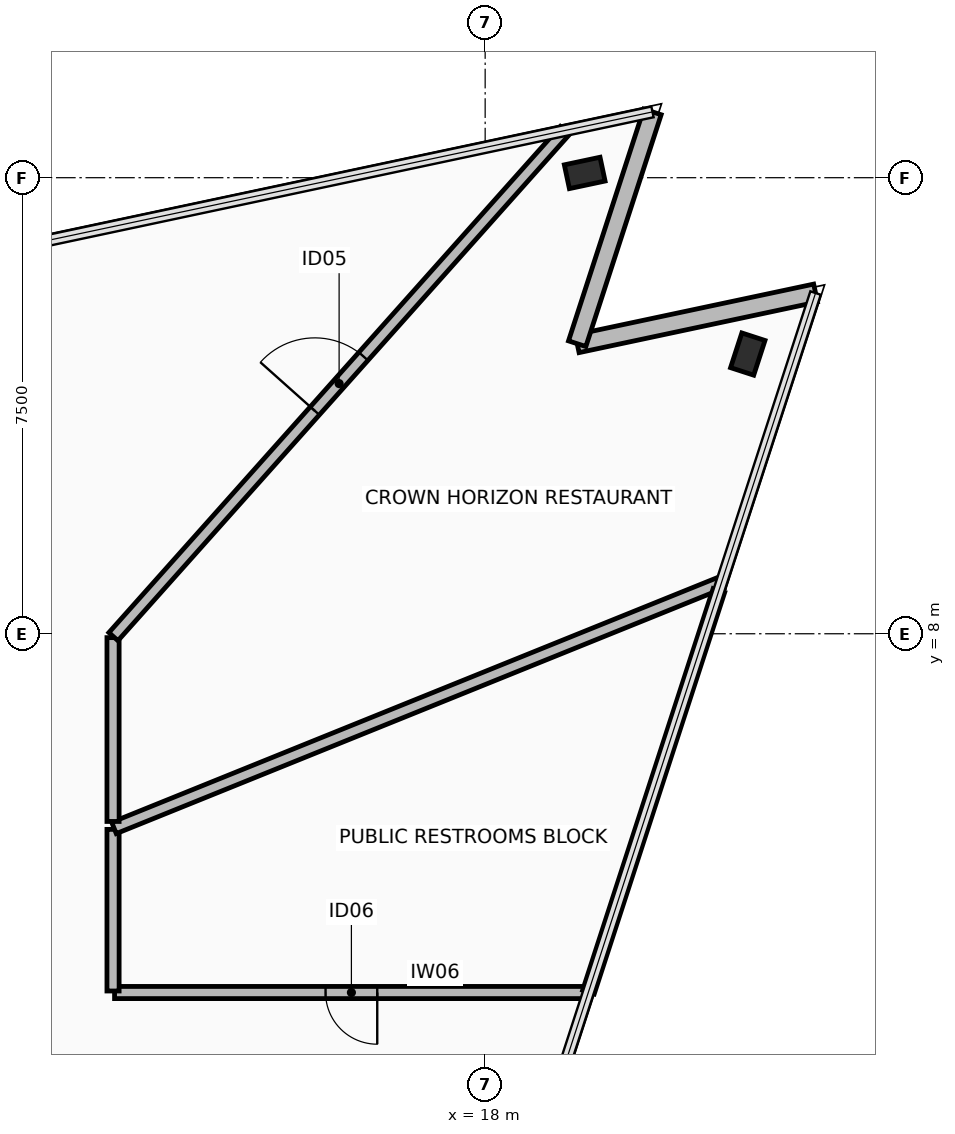
"""IFC4 building model, lengths in metres.
Left out: names, types, materials, properties, quantities, classifications, styles, units other than length and angle.
Written with IfcOpenShell. Run it as: python <this file> out.ifc"""

import sys

from ifc_helpers import new_model, si_unit, direction, frame, frame_2d, origin, origin_2d, place, context, subcontext, project, spatial, rectangle, hollow_rectangle, extrude, element, fill, save


model = new_model("IFC4")
c1 = context("Model", 3, precision=1e-05, world=origin(), true_north=direction((0.0, 1.0)))
c2 = subcontext(c1, "Body", "Model", "MODEL_VIEW")
j1 = project(units=[si_unit("LENGTHUNIT", "METRE"), si_unit("PLANEANGLEUNIT", "RADIAN")], contexts=[c1])
p1 = place(None, origin())
s1 = spatial("IfcSite", under=j1, at=p1, CompositionType="ELEMENT")
p2 = place(p1, origin())
s2 = spatial("IfcBuilding", under=s1, at=p2, CompositionType="ELEMENT")
p3 = place(p2, frame((0.0, 0.0, 298.0)))
s3 = spatial("IfcBuildingStorey", under=s2, at=p3, CompositionType="ELEMENT", Elevation=298.0)
for number, where, z_axis, x_axis in (
    (1, (22.319, 12.6, 0.0), (0.0, 0.0, 1.0), (0.309, 0.951, 0.0)),
    (2, (19.637, 15.578, 0.0), (0.0, 0.0, 1.0), (0.978, 0.208, 0.0)),
):
    element("IfcColumn", number, at=place(p3, frame(where, z_axis=z_axis, x_axis=x_axis)), inside=s3, PredefinedType="COLUMN", context=c2, shape_type="SweptSolid", body=[
        extrude(hollow_rectangle(XDim=0.4, YDim=0.6, WallThickness=0.03, at=origin_2d()), origin(), (0.0, 0.0, 1.0), 4.15),
    ])
p4 = place(p3, frame((23.434, 13.603, 0.0), z_axis=(0.0, 0.0, 1.0), x_axis=(-0.97815049033, -0.207898095871, 0.0)))
e3 = element("IfcWall", 3, at=p4, inside=s3, PredefinedType="STANDARD", context=c2, shape_type="SweptSolid", body=[
    extrude(rectangle(XDim=4.008, YDim=0.3, at=frame_2d((2.004, 0.0))), origin(), (0.0, 0.0, 1.0), 3.295),
])
p5 = place(p3, frame((19.513, 12.77, 0.0), z_axis=(0.0, 0.0, 1.0), x_axis=(0.309018580232, 0.951056001018, 0.0)))
e4 = element("IfcWall", 4, at=p5, inside=s3, PredefinedType="STANDARD", context=c2, shape_type="SweptSolid", body=[
    extrude(rectangle(XDim=4.008, YDim=0.3, at=frame_2d((2.004, 0.0))), origin(), (0.0, 0.0, 1.0), 3.295),
])
p6 = place(p3, frame((19.696, 2.1, 0.0), z_axis=(0.0, 0.0, 1.0), x_axis=(-1.0, 0.0, 0.0)))
e5 = element("IfcWall", 5, at=p6, inside=s3, PredefinedType="PARTITIONING", context=c2, shape_type="SweptSolid", body=[
    extrude(rectangle(XDim=7.791, YDim=0.2, at=frame_2d((3.896, 0.0))), origin(), (0.0, 0.0, 1.0), 3.295),
])
p7 = place(p6, frame((3.471, 0.0, 0.0)))
e6 = element("IfcOpeningElement", 6, at=p7, cuts=e5, PredefinedType="OPENING", context=c2, shape_type="SweptSolid", body=[
    extrude(rectangle(XDim=0.85, YDim=2.1, at=frame_2d((0.425, 1.05))), frame((0.0, 0.11, 0.0), z_axis=(0.0, -1.0, 0.0), x_axis=(1.0, 0.0, 0.0)), (0.0, 0.0, 1.0), 0.22),
])
p8 = place(p3, frame((11.88, 2.125, 0.0), z_axis=(0.0, 0.0, 1.0), x_axis=(0.0, 1.0, 0.0)))
e7 = element("IfcWall", 7, at=p8, inside=s3, PredefinedType="PARTITIONING", context=c2, shape_type="SweptSolid", body=[
    extrude(rectangle(XDim=2.658, YDim=0.2, at=frame_2d((1.329, 0.0))), origin(), (0.0, 0.0, 1.0), 3.95),
])
p9 = place(p3, frame((11.896, 4.806, 0.0), z_axis=(0.0, 0.0, 1.0), x_axis=(0.927185249844, 0.374603139964, 0.0)))
e8 = element("IfcWall", 8, at=p9, inside=s3, PredefinedType="PARTITIONING", context=c2, shape_type="SweptSolid", body=[
    extrude(rectangle(XDim=10.776, YDim=0.2, at=frame_2d((5.388, 0.0))), origin(), (0.0, 0.0, 1.0), 3.295),
])
p10 = place(p3, frame((21.845, 8.713, 0.0), z_axis=(0.0, 0.0, 1.0), x_axis=(-0.308995466212, -0.95106351095, 0.0)))
e9 = element("IfcWall", 9, at=p10, inside=s3, PredefinedType="PARTITIONING", context=c2, shape_type="SweptSolid", body=[
    extrude(rectangle(XDim=6.946, YDim=0.2, at=frame_2d((3.473, 0.0))), origin(), (0.0, 0.0, 1.0), 3.95),
])
p11 = place(p3, frame((11.88, 4.913, 0.0), z_axis=(0.0, 0.0, 1.0), x_axis=(0.0, 1.0, 0.0)))
e10 = element("IfcWall", 10, at=p11, inside=s3, PredefinedType="PARTITIONING", context=c2, shape_type="SweptSolid", body=[
    extrude(rectangle(XDim=3.023, YDim=0.2, at=frame_2d((1.512, 0.0))), origin(), (0.0, 0.0, 1.0), 3.95),
])
p12 = place(p3, frame((11.886, 7.953, 0.0), z_axis=(0.0, 0.0, 1.0), x_axis=(0.665691620666, 0.746226953531, 0.0)))
e11 = element("IfcWall", 11, at=p12, inside=s3, PredefinedType="PARTITIONING", context=c2, shape_type="SweptSolid", body=[
    extrude(rectangle(XDim=11.153, YDim=0.2, at=frame_2d((5.576, 0.0))), origin(), (0.0, 0.0, 1.0), 3.295),
])
p13 = place(p12, frame((4.976, 0.0, 0.0)))
e12 = element("IfcOpeningElement", 12, at=p13, cuts=e11, PredefinedType="OPENING", context=c2, shape_type="SweptSolid", body=[
    extrude(rectangle(XDim=1.2, YDim=2.15, at=frame_2d((0.6, 1.075))), frame((0.0, 0.11, 0.0), z_axis=(0.0, -1.0, 0.0), x_axis=(1.0, 0.0, 0.0)), (0.0, 0.0, 1.0), 0.22),
])
p14 = place(p7, origin())
e13 = element("IfcDoor", 13, at=p14, inside=s3, OperationType="SINGLE_SWING_RIGHT", PredefinedType="DOOR", context=c2, shape_type="SweptSolid", body=[
    extrude(rectangle(XDim=0.85, YDim=2.1, at=frame_2d((0.425, 1.05))), frame((0.0, 0.025, 0.0), z_axis=(0.0, -1.0, 0.0), x_axis=(1.0, 0.0, 0.0)), (0.0, 0.0, 1.0), 0.05),
])
fill(e6, e13)
p15 = place(p13, origin())
e14 = element("IfcDoor", 14, at=p15, inside=s3, OperationType="SINGLE_SWING_LEFT", PredefinedType="DOOR", context=c2, shape_type="SweptSolid", body=[
    extrude(rectangle(XDim=1.2, YDim=2.15, at=frame_2d((0.6, 1.075))), frame((0.0, 0.025, 0.0), z_axis=(0.0, -1.0, 0.0), x_axis=(1.0, 0.0, 0.0)), (0.0, 0.0, 1.0), 0.05),
])
fill(e12, e14)
save(model, sys.argv[1])
